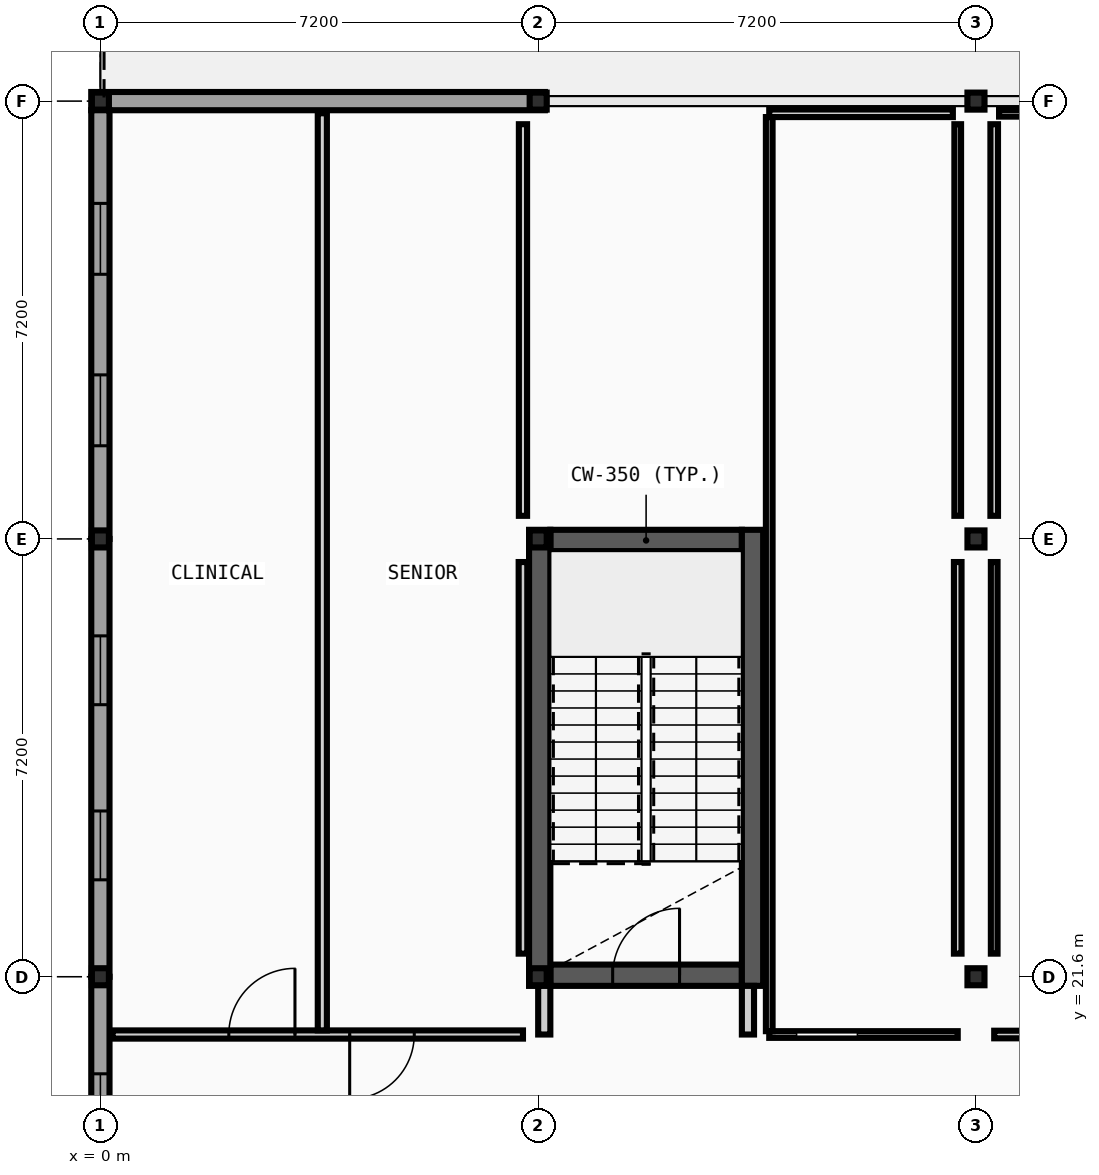
"""IFC4 building model, lengths in metres.
Left out: names, types, materials, properties, quantities, classifications, styles, units other than length and angle.
Written with IfcOpenShell. Run it as: python <this file> out.ifc"""

import sys

from ifc_helpers import new_model, si_unit, direction, frame, frame_2d, origin, origin_2d, place, context, subcontext, project, spatial, rectangle, i_section, extrude, element, fill, save


model = new_model("IFC4")
c1 = context("Model", 3, precision=1e-05, world=origin(), true_north=direction((0.0, 1.0)))
c2 = subcontext(c1, "Body", "Model", "MODEL_VIEW")
j1 = project(units=[si_unit("LENGTHUNIT", "METRE"), si_unit("PLANEANGLEUNIT", "RADIAN")], contexts=[c1])
p1 = place(None, origin())
s1 = spatial("IfcSite", under=j1, at=p1, CompositionType="ELEMENT")
p2 = place(p1, origin())
s2 = spatial("IfcBuilding", under=s1, at=p2, CompositionType="ELEMENT")
p3 = place(p2, frame((0.0, 0.0, 27.2)))
s3 = spatial("IfcBuildingStorey", under=s2, at=p3, CompositionType="ELEMENT", Elevation=27.2)
for number, where, z_axis, x_axis in (
    (1, (0.0, 21.6, 0.0), (0.0, 0.0, 1.0), (1.0, 0.0, 0.0)),
    (2, (0.0, 28.8, 0.0), (0.0, 0.0, 1.0), (1.0, 0.0, 0.0)),
    (3, (0.0, 36.0, 0.0), (0.0, 0.0, 1.0), (1.0, 0.0, 0.0)),
    (4, (7.2, 21.6, 0.0), (0.0, 0.0, 1.0), (1.0, 0.0, 0.0)),
    (5, (7.2, 28.8, 0.0), (0.0, 0.0, 1.0), (1.0, 0.0, 0.0)),
    (6, (7.2, 36.0, 0.0), (0.0, 0.0, 1.0), (1.0, 0.0, 0.0)),
    (7, (14.4, 21.6, 0.0), (0.0, 0.0, 1.0), (1.0, 0.0, 0.0)),
    (8, (14.4, 28.8, 0.0), (0.0, 0.0, 1.0), (1.0, 0.0, 0.0)),
    (9, (14.4, 36.0, 0.0), (0.0, 0.0, 1.0), (1.0, 0.0, 0.0)),
):
    element("IfcColumn", number, at=place(p3, frame(where, z_axis=z_axis, x_axis=x_axis)), inside=s3, PredefinedType="COLUMN", context=c2, shape_type="SweptSolid", body=[
        extrude(i_section(OverallWidth=0.28, OverallDepth=0.28, WebThickness=0.01, FlangeThickness=0.018, FilletRadius=0.024, at=origin_2d()), origin(), (0.0, 0.0, 1.0), 4.4),
    ])
p4 = place(p3, frame((7.31, 36.0, 0.0), z_axis=(0.0, 0.0, 1.0), x_axis=(-1.0, 0.0, 0.0)))
e10 = element("IfcWall", 10, at=p4, inside=s3, PredefinedType="STANDARD", context=c2, shape_type="SweptSolid", body=[
    extrude(rectangle(XDim=7.46, YDim=0.3, at=frame_2d((3.73, 0.0))), origin(), (0.0, 0.0, 1.0), 4.035),
])
p5 = place(p3, frame((0.0, 21.6, 0.0), z_axis=(0.0, 0.0, 1.0), x_axis=(0.0, -1.0, 0.0)))
e11 = element("IfcWall", 11, at=p5, inside=s3, PredefinedType="STANDARD", context=c2, shape_type="SweptSolid", body=[
    extrude(rectangle(XDim=7.15, YDim=0.3, at=frame_2d((3.575, 0.0))), origin(), (0.0, 0.0, 1.0), 4.18),
])
p6 = place(p5, frame((1.596, 0.0, 0.95)))
e12 = element("IfcOpeningElement", 12, at=p6, cuts=e11, PredefinedType="OPENING", context=c2, shape_type="SweptSolid", body=[
    extrude(rectangle(XDim=1.098, YDim=1.26, at=frame_2d((0.549, 0.63))), frame((0.0, 0.16, 0.0), z_axis=(0.0, -1.0, 0.0), x_axis=(1.0, 0.0, 0.0)), (0.0, 0.0, 1.0), 0.32),
])
p7 = place(p5, frame((4.456, 0.0, 0.95)))
e13 = element("IfcOpeningElement", 13, at=p7, cuts=e11, PredefinedType="OPENING", context=c2, shape_type="SweptSolid", body=[
    extrude(rectangle(XDim=1.098, YDim=1.26, at=frame_2d((0.549, 0.63))), frame((0.0, 0.16, 0.0), z_axis=(0.0, -1.0, 0.0), x_axis=(1.0, 0.0, 0.0)), (0.0, 0.0, 1.0), 0.32),
])
p8 = place(p3, frame((0.0, 28.8, 0.0), z_axis=(0.0, 0.0, 1.0), x_axis=(0.0, -1.0, 0.0)))
e14 = element("IfcWall", 14, at=p8, inside=s3, PredefinedType="STANDARD", context=c2, shape_type="SweptSolid", body=[
    extrude(rectangle(XDim=7.2, YDim=0.3, at=frame_2d((3.6, 0.0))), origin(), (0.0, 0.0, 1.0), 4.11),
])
p9 = place(p8, frame((1.594, 0.0, 0.95)))
e15 = element("IfcOpeningElement", 15, at=p9, cuts=e14, PredefinedType="OPENING", context=c2, shape_type="SweptSolid", body=[
    extrude(rectangle(XDim=1.132, YDim=1.26, at=frame_2d((0.566, 0.63))), frame((0.0, 0.16, 0.0), z_axis=(0.0, -1.0, 0.0), x_axis=(1.0, 0.0, 0.0)), (0.0, 0.0, 1.0), 0.32),
])
p10 = place(p8, frame((4.474, 0.0, 0.95)))
e16 = element("IfcOpeningElement", 16, at=p10, cuts=e14, PredefinedType="OPENING", context=c2, shape_type="SweptSolid", body=[
    extrude(rectangle(XDim=1.132, YDim=1.26, at=frame_2d((0.566, 0.63))), frame((0.0, 0.16, 0.0), z_axis=(0.0, -1.0, 0.0), x_axis=(1.0, 0.0, 0.0)), (0.0, 0.0, 1.0), 0.32),
])
p11 = place(p3, frame((0.0, 35.85, 0.0), z_axis=(0.0, 0.0, 1.0), x_axis=(0.0, -1.0, 0.0)))
e17 = element("IfcWall", 17, at=p11, inside=s3, PredefinedType="STANDARD", context=c2, shape_type="SweptSolid", body=[
    extrude(rectangle(XDim=7.05, YDim=0.3, at=frame_2d((3.525, 0.0))), origin(), (0.0, 0.0, 1.0), 4.11),
])
p12 = place(p11, frame((1.532, 0.0, 0.95)))
e18 = element("IfcOpeningElement", 18, at=p12, cuts=e17, PredefinedType="OPENING", context=c2, shape_type="SweptSolid", body=[
    extrude(rectangle(XDim=1.166, YDim=1.26, at=frame_2d((0.583, 0.63))), frame((0.0, 0.16, 0.0), z_axis=(0.0, -1.0, 0.0), x_axis=(1.0, 0.0, 0.0)), (0.0, 0.0, 1.0), 0.32),
])
p13 = place(p11, frame((4.352, 0.0, 0.95)))
e19 = element("IfcOpeningElement", 19, at=p13, cuts=e17, PredefinedType="OPENING", context=c2, shape_type="SweptSolid", body=[
    extrude(rectangle(XDim=1.166, YDim=1.26, at=frame_2d((0.583, 0.63))), frame((0.0, 0.16, 0.0), z_axis=(0.0, -1.0, 0.0), x_axis=(1.0, 0.0, 0.0)), (0.0, 0.0, 1.0), 0.32),
])
p14 = place(p3, frame((7.4, 21.625, 0.0), z_axis=(0.0, 0.0, 1.0), x_axis=(1.0, 0.0, 0.0)))
e20 = element("IfcWall", 20, at=p14, inside=s3, PredefinedType="SHEAR", context=c2, shape_type="SweptSolid", body=[
    extrude(rectangle(XDim=3.15, YDim=0.35, at=frame_2d((1.575, 0.0))), origin(), (0.0, 0.0, 1.0), 4.2),
])
p15 = place(p14, frame((1.025, 0.0, 0.0)))
e21 = element("IfcOpeningElement", 21, at=p15, cuts=e20, PredefinedType="OPENING", context=c2, shape_type="SweptSolid", body=[
    extrude(rectangle(XDim=1.1, YDim=2.15, at=frame_2d((0.55, 1.075))), frame((0.0, 0.185, 0.0), z_axis=(0.0, -1.0, 0.0), x_axis=(1.0, 0.0, 0.0)), (0.0, 0.0, 1.0), 0.37),
])
p16 = place(p3, frame((7.4, 28.775, 0.0), z_axis=(0.0, 0.0, 1.0), x_axis=(1.0, 0.0, 0.0)))
e22 = element("IfcWall", 22, at=p16, inside=s3, PredefinedType="SHEAR", context=c2, shape_type="SweptSolid", body=[
    extrude(rectangle(XDim=3.15, YDim=0.35, at=frame_2d((1.575, 0.0))), origin(), (0.0, 0.0, 1.0), 4.2),
])
for number, where, z_axis, x_axis in (
    (23, (7.225, 21.45, 0.0), (0.0, 0.0, 1.0), (0.0, 1.0, 0.0)),
    (24, (10.725, 21.45, 0.0), (0.0, 0.0, 1.0), (0.0, 1.0, 0.0)),
):
    element("IfcWall", number, at=place(p3, frame(where, z_axis=z_axis, x_axis=x_axis)), inside=s3, PredefinedType="SHEAR", context=c2, shape_type="SweptSolid", body=[
        extrude(rectangle(XDim=7.5, YDim=0.35, at=frame_2d((3.75, 0.0))), origin(), (0.0, 0.0, 1.0), 4.2),
    ])
for number, where, z_axis, x_axis in (
    (25, (7.3, 20.65, 0.0), (0.0, 0.0, 1.0), (0.0, 1.0, 0.0)),
    (26, (10.65, 20.65, 0.0), (0.0, 0.0, 1.0), (0.0, 1.0, 0.0)),
):
    element("IfcWall", number, at=place(p3, frame(where, z_axis=z_axis, x_axis=x_axis)), inside=s3, PredefinedType="PARTITIONING", context=c2, shape_type="SweptSolid", body=[
        extrude(rectangle(XDim=0.8, YDim=0.2, at=frame_2d((0.4, 0.0))), origin(), (0.0, 0.0, 1.0), 3.85),
    ])
p17 = place(p3, frame((0.2, 20.65, 0.0), z_axis=(0.0, 0.0, 1.0), x_axis=(1.0, 0.0, 0.0)))
e27 = element("IfcWall", 27, at=p17, inside=s3, PredefinedType="PARTITIONING", context=c2, shape_type="SweptSolid", body=[
    extrude(rectangle(XDim=6.75, YDim=0.135, at=frame_2d((3.375, 0.0))), origin(), (0.0, 0.0, 1.0), 4.18),
])
p18 = place(p17, frame((3.9, 0.0, 0.0)))
e28 = element("IfcOpeningElement", 28, at=p18, cuts=e27, PredefinedType="OPENING", context=c2, shape_type="SweptSolid", body=[
    extrude(rectangle(XDim=1.062, YDim=2.096, at=frame_2d((0.531, 1.048))), frame((0.0, 0.078, 0.0), z_axis=(0.0, -1.0, 0.0), x_axis=(1.0, 0.0, 0.0)), (0.0, 0.0, 1.0), 0.155),
])
p19 = place(p17, frame((1.912, 0.0, 0.0)))
e29 = element("IfcOpeningElement", 29, at=p19, cuts=e27, PredefinedType="OPENING", context=c2, shape_type="SweptSolid", body=[
    extrude(rectangle(XDim=1.088, YDim=2.096, at=frame_2d((0.544, 1.048))), frame((0.0, 0.078, 0.0), z_axis=(0.0, -1.0, 0.0), x_axis=(1.0, 0.0, 0.0)), (0.0, 0.0, 1.0), 0.155),
])
p20 = place(p3, frame((11.0, 20.65, 0.0), z_axis=(0.0, 0.0, 1.0), x_axis=(1.0, 0.0, 0.0)))
e30 = element("IfcWall", 30, at=p20, inside=s3, PredefinedType="PARTITIONING", context=c2, shape_type="SweptSolid", body=[
    extrude(rectangle(XDim=3.1, YDim=0.11, at=frame_2d((1.55, 0.0))), origin(), (0.0, 0.0, 1.0), 4.18),
])
p21 = place(p20, frame((0.45, 0.0, 0.0)))
e31 = element("IfcOpeningElement", 31, at=p21, cuts=e30, PredefinedType="OPENING", context=c2, shape_type="SweptSolid", body=[
    extrude(rectangle(XDim=1.0, YDim=2.1, at=frame_2d((0.5, 1.05))), frame((0.0, 0.065, 0.0), z_axis=(0.0, -1.0, 0.0), x_axis=(1.0, 0.0, 0.0)), (0.0, 0.0, 1.0), 0.13),
])
p22 = place(p3, frame((14.7, 20.65, 0.0), z_axis=(0.0, 0.0, 1.0), x_axis=(1.0, 0.0, 0.0)))
e32 = element("IfcWall", 32, at=p22, inside=s3, PredefinedType="PARTITIONING", context=c2, shape_type="SweptSolid", body=[
    extrude(rectangle(XDim=3.1, YDim=0.125, at=frame_2d((1.55, 0.0))), origin(), (0.0, 0.0, 1.0), 4.18),
])
p23 = place(p22, frame((1.75, 0.0, 0.0)))
e33 = element("IfcOpeningElement", 33, at=p23, cuts=e32, PredefinedType="OPENING", context=c2, shape_type="SweptSolid", body=[
    extrude(rectangle(XDim=0.9, YDim=2.1, at=frame_2d((0.45, 1.05))), frame((0.0, 0.073, 0.0), z_axis=(0.0, -1.0, 0.0), x_axis=(1.0, 0.0, 0.0)), (0.0, 0.0, 1.0), 0.145),
])
p24 = place(p3, frame((11.0, 35.8, 0.0), z_axis=(0.0, 0.0, 1.0), x_axis=(1.0, 0.0, 0.0)))
e34 = element("IfcWall", 34, at=p24, inside=s3, PredefinedType="PARTITIONING", context=c2, shape_type="SweptSolid", body=[
    extrude(rectangle(XDim=3.02, YDim=0.125, at=frame_2d((1.51, 0.0))), origin(), (0.0, 0.0, 1.0), 4.035),
])
p25 = place(p3, frame((14.78, 35.8, 0.0), z_axis=(0.0, 0.0, 1.0), x_axis=(1.0, 0.0, 0.0)))
e35 = element("IfcWall", 35, at=p25, inside=s3, PredefinedType="PARTITIONING", context=c2, shape_type="SweptSolid", body=[
    extrude(rectangle(XDim=3.02, YDim=0.11, at=frame_2d((1.51, 0.0))), origin(), (0.0, 0.0, 1.0), 4.035),
])
p26 = place(p3, frame((3.65, 20.718, 0.0), z_axis=(0.0, 0.0, 1.0), x_axis=(0.0, 1.0, 0.0)))
e36 = element("IfcWall", 36, at=p26, inside=s3, PredefinedType="PARTITIONING", context=c2, shape_type="SweptSolid", body=[
    extrude(rectangle(XDim=15.083, YDim=0.15, at=frame_2d((7.541, 0.0))), origin(), (0.0, 0.0, 1.0), 4.18),
])
p27 = place(p3, frame((6.95, 21.98, 0.0), z_axis=(0.0, 0.0, 1.0), x_axis=(0.0, 1.0, 0.0)))
e37 = element("IfcWall", 37, at=p27, inside=s3, PredefinedType="PARTITIONING", context=c2, shape_type="SweptSolid", body=[
    extrude(rectangle(XDim=6.44, YDim=0.142, at=frame_2d((3.22, 0.0))), origin(), (0.0, 0.0, 1.0), 4.18),
])
p28 = place(p3, frame((6.95, 29.18, 0.0), z_axis=(0.0, 0.0, 1.0), x_axis=(0.0, 1.0, 0.0)))
e38 = element("IfcWall", 38, at=p28, inside=s3, PredefinedType="PARTITIONING", context=c2, shape_type="SweptSolid", body=[
    extrude(rectangle(XDim=6.44, YDim=0.135, at=frame_2d((3.22, 0.0))), origin(), (0.0, 0.0, 1.0), 4.18),
])
p29 = place(p3, frame((11.0, 20.705, 0.0), z_axis=(0.0, 0.0, 1.0), x_axis=(0.0, 1.0, 0.0)))
e39 = element("IfcWall", 39, at=p29, inside=s3, PredefinedType="PARTITIONING", context=c2, shape_type="SweptSolid", body=[
    extrude(rectangle(XDim=15.032, YDim=0.11, at=frame_2d((7.516, 0.0))), origin(), (0.0, 0.0, 1.0), 4.18),
])
p30 = place(p3, frame((14.1, 21.98, 0.0), z_axis=(0.0, 0.0, 1.0), x_axis=(0.0, 1.0, 0.0)))
e40 = element("IfcWall", 40, at=p30, inside=s3, PredefinedType="PARTITIONING", context=c2, shape_type="SweptSolid", body=[
    extrude(rectangle(XDim=6.44, YDim=0.125, at=frame_2d((3.22, 0.0))), origin(), (0.0, 0.0, 1.0), 4.18),
])
p31 = place(p3, frame((14.1, 29.18, 0.0), z_axis=(0.0, 0.0, 1.0), x_axis=(0.0, 1.0, 0.0)))
e41 = element("IfcWall", 41, at=p31, inside=s3, PredefinedType="PARTITIONING", context=c2, shape_type="SweptSolid", body=[
    extrude(rectangle(XDim=6.44, YDim=0.11, at=frame_2d((3.22, 0.0))), origin(), (0.0, 0.0, 1.0), 4.18),
])
p32 = place(p3, frame((14.7, 21.98, 0.0), z_axis=(0.0, 0.0, 1.0), x_axis=(0.0, 1.0, 0.0)))
e42 = element("IfcWall", 42, at=p32, inside=s3, PredefinedType="PARTITIONING", context=c2, shape_type="SweptSolid", body=[
    extrude(rectangle(XDim=6.44, YDim=0.11, at=frame_2d((3.22, 0.0))), origin(), (0.0, 0.0, 1.0), 4.18),
])
p33 = place(p3, frame((14.7, 29.18, 0.0), z_axis=(0.0, 0.0, 1.0), x_axis=(0.0, 1.0, 0.0)))
e43 = element("IfcWall", 43, at=p33, inside=s3, PredefinedType="PARTITIONING", context=c2, shape_type="SweptSolid", body=[
    extrude(rectangle(XDim=6.44, YDim=0.125, at=frame_2d((3.22, 0.0))), origin(), (0.0, 0.0, 1.0), 4.18),
])
p34 = place(p6, origin())
e44 = element("IfcWindow", 44, at=p34, inside=s3, PartitioningType="SINGLE_PANEL", PredefinedType="WINDOW", context=c2, shape_type="SweptSolid", body=[
    extrude(rectangle(XDim=1.098, YDim=1.26, at=frame_2d((0.549, 0.63))), frame((0.0, 0.03, 0.0), z_axis=(0.0, -1.0, 0.0), x_axis=(1.0, 0.0, 0.0)), (0.0, 0.0, 1.0), 0.06),
])
fill(e12, e44)
p35 = place(p9, origin())
e45 = element("IfcWindow", 45, at=p35, inside=s3, PartitioningType="SINGLE_PANEL", PredefinedType="WINDOW", context=c2, shape_type="SweptSolid", body=[
    extrude(rectangle(XDim=1.132, YDim=1.26, at=frame_2d((0.566, 0.63))), frame((0.0, 0.03, 0.0), z_axis=(0.0, -1.0, 0.0), x_axis=(1.0, 0.0, 0.0)), (0.0, 0.0, 1.0), 0.06),
])
fill(e15, e45)
p36 = place(p10, origin())
e46 = element("IfcWindow", 46, at=p36, inside=s3, PartitioningType="SINGLE_PANEL", PredefinedType="WINDOW", context=c2, shape_type="SweptSolid", body=[
    extrude(rectangle(XDim=1.132, YDim=1.26, at=frame_2d((0.566, 0.63))), frame((0.0, 0.03, 0.0), z_axis=(0.0, -1.0, 0.0), x_axis=(1.0, 0.0, 0.0)), (0.0, 0.0, 1.0), 0.06),
])
fill(e16, e46)
p37 = place(p12, origin())
e47 = element("IfcWindow", 47, at=p37, inside=s3, PartitioningType="SINGLE_PANEL", PredefinedType="WINDOW", context=c2, shape_type="SweptSolid", body=[
    extrude(rectangle(XDim=1.166, YDim=1.26, at=frame_2d((0.583, 0.63))), frame((0.0, 0.03, 0.0), z_axis=(0.0, -1.0, 0.0), x_axis=(1.0, 0.0, 0.0)), (0.0, 0.0, 1.0), 0.06),
])
fill(e18, e47)
p38 = place(p13, origin())
e48 = element("IfcWindow", 48, at=p38, inside=s3, PartitioningType="SINGLE_PANEL", PredefinedType="WINDOW", context=c2, shape_type="SweptSolid", body=[
    extrude(rectangle(XDim=1.166, YDim=1.26, at=frame_2d((0.583, 0.63))), frame((0.0, 0.03, 0.0), z_axis=(0.0, -1.0, 0.0), x_axis=(1.0, 0.0, 0.0)), (0.0, 0.0, 1.0), 0.06),
])
fill(e19, e48)
p39 = place(p15, frame((1.1, 0.0, 0.0), z_axis=(0.0, 0.0, 1.0), x_axis=(-1.0, 0.0, 0.0)))
e49 = element("IfcDoor", 49, at=p39, inside=s3, OperationType="SINGLE_SWING_RIGHT", PredefinedType="DOOR", context=c2, shape_type="SweptSolid", body=[
    extrude(rectangle(XDim=1.1, YDim=2.15, at=frame_2d((0.55, 1.075))), frame((0.0, 0.025, 0.0), z_axis=(0.0, -1.0, 0.0), x_axis=(1.0, 0.0, 0.0)), (0.0, 0.0, 1.0), 0.05),
])
fill(e21, e49)
p40 = place(p21, frame((1.0, 0.0, 0.0), z_axis=(0.0, 0.0, 1.0), x_axis=(-1.0, 0.0, 0.0)))
e50 = element("IfcDoor", 50, at=p40, inside=s3, OperationType="SLIDING_TO_LEFT", PredefinedType="DOOR", context=c2, shape_type="SweptSolid", body=[
    extrude(rectangle(XDim=1.0, YDim=2.1, at=frame_2d((0.5, 1.05))), frame((0.0, 0.025, 0.0), z_axis=(0.0, -1.0, 0.0), x_axis=(1.0, 0.0, 0.0)), (0.0, 0.0, 1.0), 0.05),
])
fill(e31, e50)
p41 = place(p18, frame((1.062, 0.0, 0.0), z_axis=(0.0, 0.0, 1.0), x_axis=(-1.0, 0.0, 0.0)))
e51 = element("IfcDoor", 51, at=p41, inside=s3, OperationType="SINGLE_SWING_LEFT", PredefinedType="DOOR", context=c2, shape_type="SweptSolid", body=[
    extrude(rectangle(XDim=1.062, YDim=2.096, at=frame_2d((0.531, 1.048))), frame((0.0, 0.025, 0.0), z_axis=(0.0, -1.0, 0.0), x_axis=(1.0, 0.0, 0.0)), (0.0, 0.0, 1.0), 0.05),
])
fill(e28, e51)
p42 = place(p19, frame((1.088, 0.0, 0.0), z_axis=(0.0, 0.0, 1.0), x_axis=(-1.0, 0.0, 0.0)))
e52 = element("IfcDoor", 52, at=p42, inside=s3, OperationType="SINGLE_SWING_RIGHT", PredefinedType="DOOR", context=c2, shape_type="SweptSolid", body=[
    extrude(rectangle(XDim=1.088, YDim=2.096, at=frame_2d((0.544, 1.048))), frame((0.0, 0.025, 0.0), z_axis=(0.0, -1.0, 0.0), x_axis=(1.0, 0.0, 0.0)), (0.0, 0.0, 1.0), 0.05),
])
fill(e29, e52)
save(model, sys.argv[1])
